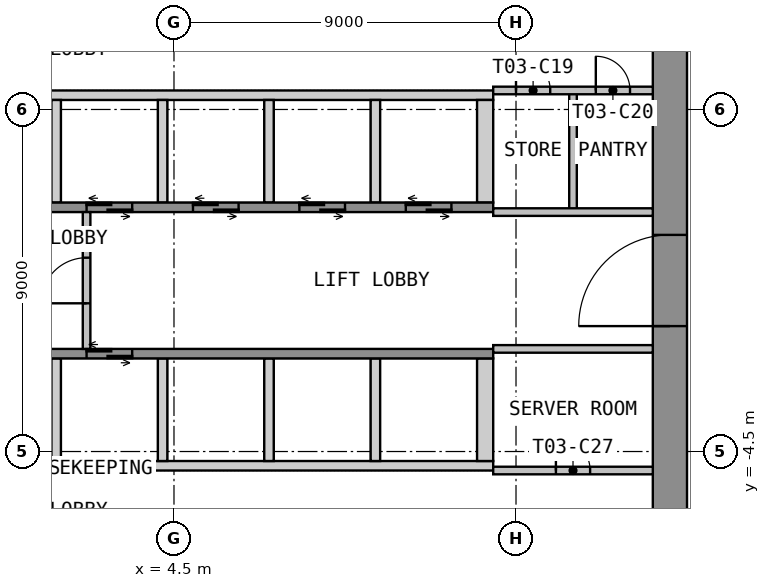
"""IFC4 building model, lengths in metres.
Left out: names, types, materials, properties, quantities, classifications, styles, units other than length and angle.
Written with IfcOpenShell. Run it as: python <this file> out.ifc"""

import sys

from ifc_helpers import new_model, si_unit, direction, frame, frame_2d, origin, place, context, subcontext, project, spatial, polyline, rectangle, outline, extrude, element, fill, save


model = new_model("IFC4")
c1 = context("Model", 3, precision=1e-05, world=origin(), true_north=direction((0.0, 1.0)))
c2 = subcontext(c1, "Body", "Model", "MODEL_VIEW")
j1 = project(units=[si_unit("LENGTHUNIT", "METRE"), si_unit("PLANEANGLEUNIT", "RADIAN")], contexts=[c1])
p1 = place(None, origin())
s1 = spatial("IfcSite", under=j1, at=p1, CompositionType="ELEMENT")
p2 = place(p1, origin())
s2 = spatial("IfcBuilding", under=s1, at=p2, CompositionType="ELEMENT")
p3 = place(p2, frame((0.0, 0.0, 53.4)))
s3 = spatial("IfcBuildingStorey", under=s2, at=p3, CompositionType="ELEMENT", Elevation=53.4)
p4 = place(p3, frame((17.55, -12.6, 0.0), z_axis=(0.0, 0.0, 1.0), x_axis=(0.0, 1.0, 0.0)))
e1 = element("IfcWall", 1, at=p4, inside=s3, PredefinedType="SHEAR", context=c2, shape_type="SweptSolid", body=[
    extrude(rectangle(XDim=25.2, YDim=0.9, at=frame_2d((12.6, 0.0))), origin(), (0.0, 0.0, 1.0), 3.525),
])
p5 = place(p4, frame((11.4, 0.0, 0.0)))
e2 = element("IfcOpeningElement", 2, at=p5, cuts=e1, PredefinedType="OPENING", context=c2, shape_type="SweptSolid", body=[
    extrude(rectangle(XDim=2.4, YDim=2.1, at=frame_2d((1.2, 1.05))), frame((0.0, 0.46, 0.0), z_axis=(0.0, -1.0, 0.0), x_axis=(1.0, 0.0, 0.0)), (0.0, 0.0, 1.0), 0.92),
])
p6 = place(p3, origin())
e3 = element("IfcWall", 3, at=p6, inside=s3, PredefinedType="SHEAR", context=c2, shape_type="SweptSolid", body=[
    extrude(outline(polyline([(-12.9, 4.75), (12.9, 4.75), (12.9, 5.0), (-12.9, 5.0), (-12.9, 4.75)])), origin(), (0.0, 0.0, 1.0), 3.525),
])
p7 = place(p3, origin())
e4 = element("IfcWall", 4, at=p7, inside=s3, PredefinedType="SHEAR", context=c2, shape_type="SweptSolid", body=[
    extrude(outline(polyline([(1.275, 2.05), (1.525, 2.05), (1.525, 4.75), (1.275, 4.75), (1.275, 2.05)])), origin(), (0.0, 0.0, 1.0), 3.525),
])
p8 = place(p3, origin())
e5 = element("IfcWall", 5, at=p8, inside=s3, PredefinedType="SHEAR", context=c2, shape_type="SweptSolid", body=[
    extrude(outline(polyline([(4.075, 2.05), (4.325, 2.05), (4.325, 4.75), (4.075, 4.75), (4.075, 2.05)])), origin(), (0.0, 0.0, 1.0), 3.525),
])
p9 = place(p3, origin())
e6 = element("IfcWall", 6, at=p9, inside=s3, PredefinedType="SHEAR", context=c2, shape_type="SweptSolid", body=[
    extrude(outline(polyline([(6.875, 2.05), (7.125, 2.05), (7.125, 4.75), (6.875, 4.75), (6.875, 2.05)])), origin(), (0.0, 0.0, 1.0), 3.525),
])
p10 = place(p3, origin())
e7 = element("IfcWall", 7, at=p10, inside=s3, PredefinedType="SHEAR", context=c2, shape_type="SweptSolid", body=[
    extrude(outline(polyline([(9.675, 2.05), (9.925, 2.05), (9.925, 4.75), (9.675, 4.75), (9.675, 2.05)])), origin(), (0.0, 0.0, 1.0), 3.525),
])
p11 = place(p3, origin())
e8 = element("IfcWall", 8, at=p11, inside=s3, PredefinedType="SHEAR", context=c2, shape_type="SweptSolid", body=[
    extrude(outline(polyline([(12.475, 2.05), (12.9, 2.05), (12.9, 4.75), (12.475, 4.75), (12.475, 2.05)])), origin(), (0.0, 0.0, 1.0), 3.525),
])
p12 = place(p3, frame((-12.9, 1.925, 0.0), z_axis=(0.0, 0.0, 1.0), x_axis=(1.0, 0.0, 0.0)))
e9 = element("IfcWall", 9, at=p12, inside=s3, PredefinedType="SHEAR", context=c2, shape_type="SweptSolid", body=[
    extrude(rectangle(XDim=25.8, YDim=0.25, at=frame_2d((12.9, 0.0))), origin(), (0.0, 0.0, 1.0), 3.525),
])
p13 = place(p12, frame((9.5, 0.0, 0.0)))
e10 = element("IfcOpeningElement", 10, at=p13, cuts=e9, PredefinedType="OPENING", context=c2, shape_type="SweptSolid", body=[
    extrude(rectangle(XDim=1.2, YDim=2.1, at=frame_2d((0.6, 1.05))), frame((0.0, 0.135, 0.0), z_axis=(0.0, -1.0, 0.0), x_axis=(1.0, 0.0, 0.0)), (0.0, 0.0, 1.0), 0.27),
])
p14 = place(p12, frame((12.3, 0.0, 0.0)))
e11 = element("IfcOpeningElement", 11, at=p14, cuts=e9, PredefinedType="OPENING", context=c2, shape_type="SweptSolid", body=[
    extrude(rectangle(XDim=1.2, YDim=2.1, at=frame_2d((0.6, 1.05))), frame((0.0, 0.135, 0.0), z_axis=(0.0, -1.0, 0.0), x_axis=(1.0, 0.0, 0.0)), (0.0, 0.0, 1.0), 0.27),
])
p15 = place(p12, frame((15.1, 0.0, 0.0)))
e12 = element("IfcOpeningElement", 12, at=p15, cuts=e9, PredefinedType="OPENING", context=c2, shape_type="SweptSolid", body=[
    extrude(rectangle(XDim=1.2, YDim=2.1, at=frame_2d((0.6, 1.05))), frame((0.0, 0.135, 0.0), z_axis=(0.0, -1.0, 0.0), x_axis=(1.0, 0.0, 0.0)), (0.0, 0.0, 1.0), 0.27),
])
p16 = place(p12, frame((17.9, 0.0, 0.0)))
e13 = element("IfcOpeningElement", 13, at=p16, cuts=e9, PredefinedType="OPENING", context=c2, shape_type="SweptSolid", body=[
    extrude(rectangle(XDim=1.2, YDim=2.1, at=frame_2d((0.6, 1.05))), frame((0.0, 0.135, 0.0), z_axis=(0.0, -1.0, 0.0), x_axis=(1.0, 0.0, 0.0)), (0.0, 0.0, 1.0), 0.27),
])
p17 = place(p12, frame((20.7, 0.0, 0.0)))
e14 = element("IfcOpeningElement", 14, at=p17, cuts=e9, PredefinedType="OPENING", context=c2, shape_type="SweptSolid", body=[
    extrude(rectangle(XDim=1.2, YDim=2.1, at=frame_2d((0.6, 1.05))), frame((0.0, 0.135, 0.0), z_axis=(0.0, -1.0, 0.0), x_axis=(1.0, 0.0, 0.0)), (0.0, 0.0, 1.0), 0.27),
])
p18 = place(p12, frame((23.5, 0.0, 0.0)))
e15 = element("IfcOpeningElement", 15, at=p18, cuts=e9, PredefinedType="OPENING", context=c2, shape_type="SweptSolid", body=[
    extrude(rectangle(XDim=1.2, YDim=2.1, at=frame_2d((0.6, 1.05))), frame((0.0, 0.135, 0.0), z_axis=(0.0, -1.0, 0.0), x_axis=(1.0, 0.0, 0.0)), (0.0, 0.0, 1.0), 0.27),
])
p19 = place(p3, origin())
e16 = element("IfcWall", 16, at=p19, inside=s3, PredefinedType="SHEAR", context=c2, shape_type="SweptSolid", body=[
    extrude(outline(polyline([(-12.9, -5.0), (12.9, -5.0), (12.9, -4.75), (-12.9, -4.75), (-12.9, -5.0)])), origin(), (0.0, 0.0, 1.0), 3.525),
])
p20 = place(p3, origin())
e17 = element("IfcWall", 17, at=p20, inside=s3, PredefinedType="SHEAR", context=c2, shape_type="SweptSolid", body=[
    extrude(outline(polyline([(1.275, -4.75), (1.525, -4.75), (1.525, -2.05), (1.275, -2.05), (1.275, -4.75)])), origin(), (0.0, 0.0, 1.0), 3.525),
])
p21 = place(p3, origin())
e18 = element("IfcWall", 18, at=p21, inside=s3, PredefinedType="SHEAR", context=c2, shape_type="SweptSolid", body=[
    extrude(outline(polyline([(4.075, -4.75), (4.325, -4.75), (4.325, -2.05), (4.075, -2.05), (4.075, -4.75)])), origin(), (0.0, 0.0, 1.0), 3.525),
])
p22 = place(p3, origin())
e19 = element("IfcWall", 19, at=p22, inside=s3, PredefinedType="SHEAR", context=c2, shape_type="SweptSolid", body=[
    extrude(outline(polyline([(6.875, -4.75), (7.125, -4.75), (7.125, -2.05), (6.875, -2.05), (6.875, -4.75)])), origin(), (0.0, 0.0, 1.0), 3.525),
])
p23 = place(p3, origin())
e20 = element("IfcWall", 20, at=p23, inside=s3, PredefinedType="SHEAR", context=c2, shape_type="SweptSolid", body=[
    extrude(outline(polyline([(9.675, -4.75), (9.925, -4.75), (9.925, -2.05), (9.675, -2.05), (9.675, -4.75)])), origin(), (0.0, 0.0, 1.0), 3.525),
])
p24 = place(p3, origin())
e21 = element("IfcWall", 21, at=p24, inside=s3, PredefinedType="SHEAR", context=c2, shape_type="SweptSolid", body=[
    extrude(outline(polyline([(12.475, -4.75), (12.9, -4.75), (12.9, -2.05), (12.475, -2.05), (12.475, -4.75)])), origin(), (0.0, 0.0, 1.0), 3.525),
])
p25 = place(p3, frame((-12.9, -1.925, 0.0), z_axis=(0.0, 0.0, 1.0), x_axis=(1.0, 0.0, 0.0)))
e22 = element("IfcWall", 22, at=p25, inside=s3, PredefinedType="SHEAR", context=c2, shape_type="SweptSolid", body=[
    extrude(rectangle(XDim=25.8, YDim=0.25, at=frame_2d((12.9, 0.0))), origin(), (0.0, 0.0, 1.0), 3.525),
])
p26 = place(p25, frame((1.1, 0.0, 0.0)))
e23 = element("IfcOpeningElement", 23, at=p26, cuts=e22, PredefinedType="OPENING", context=c2, shape_type="SweptSolid", body=[
    extrude(rectangle(XDim=1.2, YDim=2.1, at=frame_2d((0.6, 1.05))), frame((0.0, 0.135, 0.0), z_axis=(0.0, -1.0, 0.0), x_axis=(1.0, 0.0, 0.0)), (0.0, 0.0, 1.0), 0.27),
])
p27 = place(p25, frame((3.9, 0.0, 0.0)))
e24 = element("IfcOpeningElement", 24, at=p27, cuts=e22, PredefinedType="OPENING", context=c2, shape_type="SweptSolid", body=[
    extrude(rectangle(XDim=1.2, YDim=2.1, at=frame_2d((0.6, 1.05))), frame((0.0, 0.135, 0.0), z_axis=(0.0, -1.0, 0.0), x_axis=(1.0, 0.0, 0.0)), (0.0, 0.0, 1.0), 0.27),
])
p28 = place(p25, frame((6.7, 0.0, 0.0)))
e25 = element("IfcOpeningElement", 25, at=p28, cuts=e22, PredefinedType="OPENING", context=c2, shape_type="SweptSolid", body=[
    extrude(rectangle(XDim=1.2, YDim=2.1, at=frame_2d((0.6, 1.05))), frame((0.0, 0.135, 0.0), z_axis=(0.0, -1.0, 0.0), x_axis=(1.0, 0.0, 0.0)), (0.0, 0.0, 1.0), 0.27),
])
p29 = place(p25, frame((9.5, 0.0, 0.0)))
e26 = element("IfcOpeningElement", 26, at=p29, cuts=e22, PredefinedType="OPENING", context=c2, shape_type="SweptSolid", body=[
    extrude(rectangle(XDim=1.2, YDim=2.1, at=frame_2d((0.6, 1.05))), frame((0.0, 0.135, 0.0), z_axis=(0.0, -1.0, 0.0), x_axis=(1.0, 0.0, 0.0)), (0.0, 0.0, 1.0), 0.27),
])
p30 = place(p25, frame((12.3, 0.0, 0.0)))
e27 = element("IfcOpeningElement", 27, at=p30, cuts=e22, PredefinedType="OPENING", context=c2, shape_type="SweptSolid", body=[
    extrude(rectangle(XDim=1.2, YDim=2.1, at=frame_2d((0.6, 1.05))), frame((0.0, 0.135, 0.0), z_axis=(0.0, -1.0, 0.0), x_axis=(1.0, 0.0, 0.0)), (0.0, 0.0, 1.0), 0.27),
])
p31 = place(p25, frame((15.1, 0.0, 0.0)))
e28 = element("IfcOpeningElement", 28, at=p31, cuts=e22, PredefinedType="OPENING", context=c2, shape_type="SweptSolid", body=[
    extrude(rectangle(XDim=1.2, YDim=2.1, at=frame_2d((0.6, 1.05))), frame((0.0, 0.135, 0.0), z_axis=(0.0, -1.0, 0.0), x_axis=(1.0, 0.0, 0.0)), (0.0, 0.0, 1.0), 0.27),
])
p32 = place(p3, frame((2.2, -1.8, 0.0), z_axis=(0.0, 0.0, 1.0), x_axis=(0.0, 1.0, 0.0)))
e29 = element("IfcWall", 29, at=p32, inside=s3, PredefinedType="PARTITIONING", context=c2, shape_type="SweptSolid", body=[
    extrude(rectangle(XDim=3.6, YDim=0.2, at=frame_2d((1.8, 0.0))), origin(), (0.0, 0.0, 1.0), 3.525),
])
p33 = place(p32, frame((1.2, 0.0, 0.0)))
e30 = element("IfcOpeningElement", 30, at=p33, cuts=e29, PredefinedType="OPENING", context=c2, shape_type="SweptSolid", body=[
    extrude(rectangle(XDim=1.2, YDim=2.1, at=frame_2d((0.6, 1.05))), frame((0.0, 0.11, 0.0), z_axis=(0.0, -1.0, 0.0), x_axis=(1.0, 0.0, 0.0)), (0.0, 0.0, 1.0), 0.22),
])
p34 = place(p3, frame((15.0, 1.8, 0.0), z_axis=(0.0, 0.0, 1.0), x_axis=(0.0, 1.0, 0.0)))
e31 = element("IfcWall", 31, at=p34, inside=s3, PredefinedType="PARTITIONING", context=c2, shape_type="SweptSolid", body=[
    extrude(rectangle(XDim=3.2, YDim=0.2, at=frame_2d((1.6, 0.0))), origin(), (0.0, 0.0, 1.0), 3.525),
])
p35 = place(p3, frame((12.9, 5.0, 0.0), z_axis=(0.0, 0.0, 1.0), x_axis=(1.0, 0.0, 0.0)))
e32 = element("IfcWall", 32, at=p35, inside=s3, PredefinedType="PARTITIONING", context=c2, shape_type="SweptSolid", body=[
    extrude(rectangle(XDim=4.2, YDim=0.2, at=frame_2d((2.1, 0.0))), origin(), (0.0, 0.0, 1.0), 3.525),
])
p36 = place(p35, frame((0.6, 0.0, 0.0)))
e33 = element("IfcOpeningElement", 33, at=p36, cuts=e32, PredefinedType="OPENING", context=c2, shape_type="SweptSolid", body=[
    extrude(rectangle(XDim=0.9, YDim=2.1, at=frame_2d((0.45, 1.05))), frame((0.0, 0.11, 0.0), z_axis=(0.0, -1.0, 0.0), x_axis=(1.0, 0.0, 0.0)), (0.0, 0.0, 1.0), 0.22),
])
p37 = place(p35, frame((2.7, 0.0, 0.0)))
e34 = element("IfcOpeningElement", 34, at=p37, cuts=e32, PredefinedType="OPENING", context=c2, shape_type="SweptSolid", body=[
    extrude(rectangle(XDim=0.9, YDim=2.1, at=frame_2d((0.45, 1.05))), frame((0.0, 0.11, 0.0), z_axis=(0.0, -1.0, 0.0), x_axis=(1.0, 0.0, 0.0)), (0.0, 0.0, 1.0), 0.22),
])
p38 = place(p3, frame((12.9, 1.8, 0.0), z_axis=(0.0, 0.0, 1.0), x_axis=(1.0, 0.0, 0.0)))
e35 = element("IfcWall", 35, at=p38, inside=s3, PredefinedType="PARTITIONING", context=c2, shape_type="SweptSolid", body=[
    extrude(rectangle(XDim=4.2, YDim=0.2, at=frame_2d((2.1, 0.0))), origin(), (0.0, 0.0, 1.0), 3.525),
])
p39 = place(p3, frame((12.9, -5.0, 0.0), z_axis=(0.0, 0.0, 1.0), x_axis=(1.0, 0.0, 0.0)))
e36 = element("IfcWall", 36, at=p39, inside=s3, PredefinedType="PARTITIONING", context=c2, shape_type="SweptSolid", body=[
    extrude(rectangle(XDim=4.2, YDim=0.2, at=frame_2d((2.1, 0.0))), origin(), (0.0, 0.0, 1.0), 3.525),
])
p40 = place(p39, frame((1.65, 0.0, 0.0)))
e37 = element("IfcOpeningElement", 37, at=p40, cuts=e36, PredefinedType="OPENING", context=c2, shape_type="SweptSolid", body=[
    extrude(rectangle(XDim=0.9, YDim=2.1, at=frame_2d((0.45, 1.05))), frame((0.0, 0.11, 0.0), z_axis=(0.0, -1.0, 0.0), x_axis=(1.0, 0.0, 0.0)), (0.0, 0.0, 1.0), 0.22),
])
p41 = place(p3, frame((12.9, -1.8, 0.0), z_axis=(0.0, 0.0, 1.0), x_axis=(1.0, 0.0, 0.0)))
e38 = element("IfcWall", 38, at=p41, inside=s3, PredefinedType="PARTITIONING", context=c2, shape_type="SweptSolid", body=[
    extrude(rectangle(XDim=4.2, YDim=0.2, at=frame_2d((2.1, 0.0))), origin(), (0.0, 0.0, 1.0), 3.525),
])
p42 = place(p5, origin())
e39 = element("IfcDoor", 39, at=p42, inside=s3, OperationType="DOUBLE_DOOR_DOUBLE_SWING", PredefinedType="DOOR", context=c2, shape_type="SweptSolid", body=[
    extrude(rectangle(XDim=2.4, YDim=2.1, at=frame_2d((1.2, 1.05))), frame((0.0, 0.025, 0.0), z_axis=(0.0, -1.0, 0.0), x_axis=(1.0, 0.0, 0.0)), (0.0, 0.0, 1.0), 0.05),
])
fill(e2, e39)
p43 = place(p15, origin())
e40 = element("IfcDoor", 40, at=p43, inside=s3, OperationType="DOUBLE_DOOR_SLIDING", PredefinedType="DOOR", context=c2, shape_type="SweptSolid", body=[
    extrude(rectangle(XDim=1.2, YDim=2.1, at=frame_2d((0.6, 1.05))), frame((0.0, 0.025, 0.0), z_axis=(0.0, -1.0, 0.0), x_axis=(1.0, 0.0, 0.0)), (0.0, 0.0, 1.0), 0.05),
])
fill(e12, e40)
p44 = place(p16, origin())
e41 = element("IfcDoor", 41, at=p44, inside=s3, OperationType="DOUBLE_DOOR_SLIDING", PredefinedType="DOOR", context=c2, shape_type="SweptSolid", body=[
    extrude(rectangle(XDim=1.2, YDim=2.1, at=frame_2d((0.6, 1.05))), frame((0.0, 0.025, 0.0), z_axis=(0.0, -1.0, 0.0), x_axis=(1.0, 0.0, 0.0)), (0.0, 0.0, 1.0), 0.05),
])
fill(e13, e41)
p45 = place(p17, origin())
e42 = element("IfcDoor", 42, at=p45, inside=s3, OperationType="DOUBLE_DOOR_SLIDING", PredefinedType="DOOR", context=c2, shape_type="SweptSolid", body=[
    extrude(rectangle(XDim=1.2, YDim=2.1, at=frame_2d((0.6, 1.05))), frame((0.0, 0.025, 0.0), z_axis=(0.0, -1.0, 0.0), x_axis=(1.0, 0.0, 0.0)), (0.0, 0.0, 1.0), 0.05),
])
fill(e14, e42)
p46 = place(p18, origin())
e43 = element("IfcDoor", 43, at=p46, inside=s3, OperationType="DOUBLE_DOOR_SLIDING", PredefinedType="DOOR", context=c2, shape_type="SweptSolid", body=[
    extrude(rectangle(XDim=1.2, YDim=2.1, at=frame_2d((0.6, 1.05))), frame((0.0, 0.025, 0.0), z_axis=(0.0, -1.0, 0.0), x_axis=(1.0, 0.0, 0.0)), (0.0, 0.0, 1.0), 0.05),
])
fill(e15, e43)
p47 = place(p31, origin())
e44 = element("IfcDoor", 44, at=p47, inside=s3, OperationType="DOUBLE_DOOR_SLIDING", PredefinedType="DOOR", context=c2, shape_type="SweptSolid", body=[
    extrude(rectangle(XDim=1.2, YDim=2.1, at=frame_2d((0.6, 1.05))), frame((0.0, 0.025, 0.0), z_axis=(0.0, -1.0, 0.0), x_axis=(1.0, 0.0, 0.0)), (0.0, 0.0, 1.0), 0.05),
])
fill(e28, e44)
p48 = place(p33, origin())
e45 = element("IfcDoor", 45, at=p48, inside=s3, OperationType="SINGLE_SWING_LEFT", PredefinedType="DOOR", context=c2, shape_type="SweptSolid", body=[
    extrude(rectangle(XDim=1.2, YDim=2.1, at=frame_2d((0.6, 1.05))), frame((0.0, 0.025, 0.0), z_axis=(0.0, -1.0, 0.0), x_axis=(1.0, 0.0, 0.0)), (0.0, 0.0, 1.0), 0.05),
])
fill(e30, e45)
p49 = place(p36, origin())
e46 = element("IfcDoor", 46, at=p49, inside=s3, OperationType="SINGLE_SWING_LEFT", PredefinedType="DOOR", context=c2, shape_type="SweptSolid", body=[
    extrude(rectangle(XDim=0.9, YDim=2.1, at=frame_2d((0.45, 1.05))), frame((0.0, 0.025, 0.0), z_axis=(0.0, -1.0, 0.0), x_axis=(1.0, 0.0, 0.0)), (0.0, 0.0, 1.0), 0.05),
])
fill(e33, e46)
p50 = place(p37, origin())
e47 = element("IfcDoor", 47, at=p50, inside=s3, OperationType="SINGLE_SWING_LEFT", PredefinedType="DOOR", context=c2, shape_type="SweptSolid", body=[
    extrude(rectangle(XDim=0.9, YDim=2.1, at=frame_2d((0.45, 1.05))), frame((0.0, 0.025, 0.0), z_axis=(0.0, -1.0, 0.0), x_axis=(1.0, 0.0, 0.0)), (0.0, 0.0, 1.0), 0.05),
])
fill(e34, e47)
p51 = place(p40, origin())
e48 = element("IfcDoor", 48, at=p51, inside=s3, OperationType="SINGLE_SWING_LEFT", PredefinedType="DOOR", context=c2, shape_type="SweptSolid", body=[
    extrude(rectangle(XDim=0.9, YDim=2.1, at=frame_2d((0.45, 1.05))), frame((0.0, 0.025, 0.0), z_axis=(0.0, -1.0, 0.0), x_axis=(1.0, 0.0, 0.0)), (0.0, 0.0, 1.0), 0.05),
])
fill(e37, e48)
save(model, sys.argv[1])
